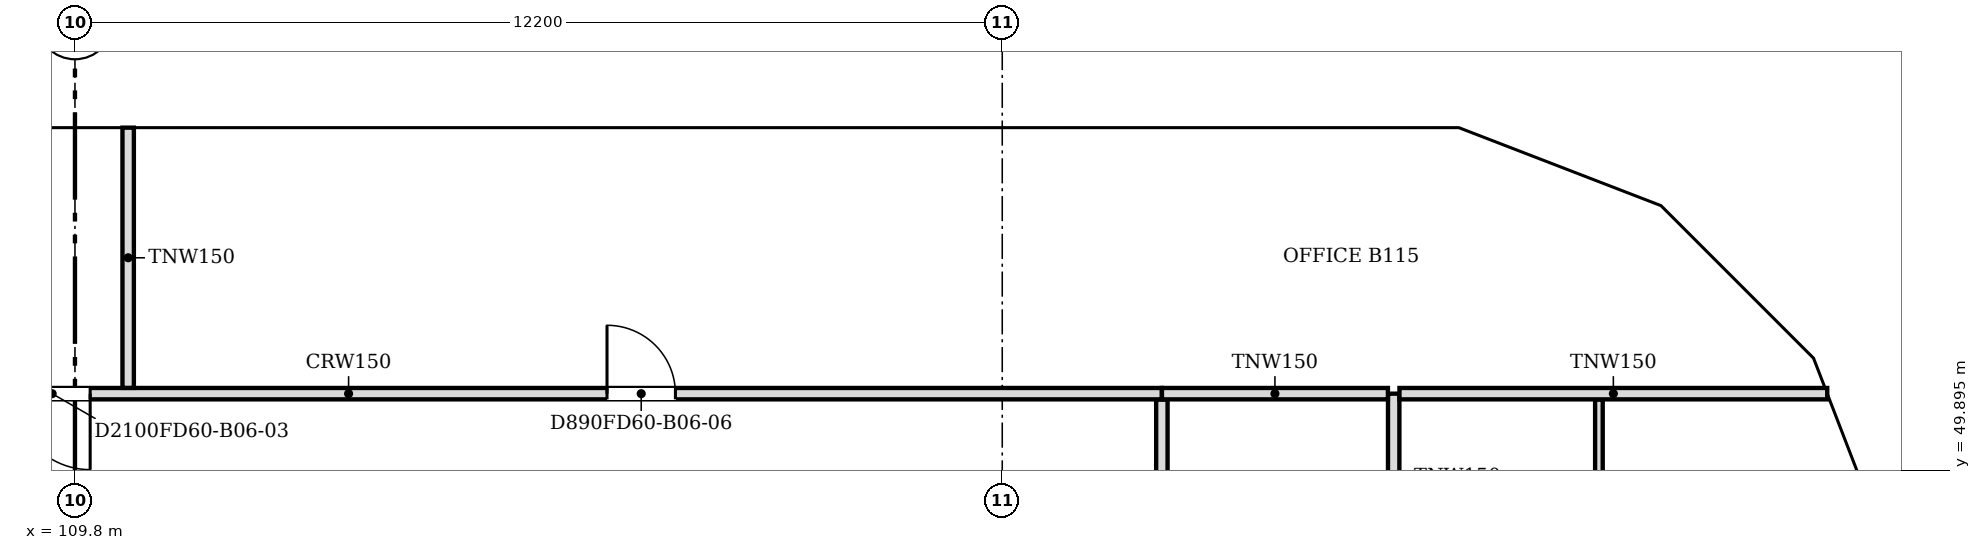
"""IFC4 building model, lengths in metres.
Left out: names, types, materials, properties, quantities, classifications, styles, units other than length and angle.
Written with IfcOpenShell. Run it as: python <this file> out.ifc"""

import sys

from ifc_helpers import new_model, si_unit, direction, frame, frame_2d, origin, place, context, subcontext, project, spatial, polyline, rectangle, outline, extrude, faceted_brep, source, transform, mapped, element, fill, save


model = new_model("IFC4")
c1 = context("Model", 3, precision=1e-05, world=origin(), true_north=direction((0.0, 1.0)))
c2 = subcontext(c1, "Body", "Model", "MODEL_VIEW")
j1 = project(units=[si_unit("LENGTHUNIT", "METRE"), si_unit("PLANEANGLEUNIT", "RADIAN")], contexts=[c1])
p1 = place(None, origin())
s1 = spatial("IfcSite", under=j1, at=p1, CompositionType="ELEMENT")
p2 = place(p1, origin())
s2 = spatial("IfcBuilding", under=s1, at=p2, CompositionType="ELEMENT")
p3 = place(p2, frame((0.0, 0.0, 56.2)))
s3 = spatial("IfcBuildingStorey", under=s2, at=p3, CompositionType="ELEMENT", Elevation=56.2)
m1 = source(origin(), c2, "Body", "Brep", [
    faceted_brep([(2.95, -0.25, 0.0), (3.003, -0.25, 0.068), (3.003, -0.25, 7.532), (2.95, -0.25, 7.6), (0.0, -0.25, 3.8), (0.047, 0.25, 3.86), (2.898, 0.25, 7.532), (2.898, 0.25, 0.068), (0.047, 0.25, 3.74), (2.95, 0.0, 0.0), (2.95, 0.0, 7.6), (0.0, 0.0, 3.8)], [[[0, 1, 2, 3, 4]], [[5, 6, 7, 8]], [[1, 0, 9]], [[10, 3, 2]], [[6, 5, 11, 4, 3, 10]], [[8, 7, 9, 0, 4, 11]], [[8, 11, 5]], [[1, 9, 7, 6, 10, 2]]]),
])
p4 = place(p3, frame((133.95, 48.753, -3.8), z_axis=(0.0, 0.0, 1.0), x_axis=(-0.359855894603, 0.933007896601, 0.0)))
e1 = element("IfcWall", 1, at=p4, inside=s3, PredefinedType="SOLIDWALL", context=c2, shape_type="MappedRepresentation", body=[
    mapped(m1, transform((0.0, 0.0, 0.0), scale=1.0)),
])
m2 = source(origin(), c2, "Body", "SweptSolid", [
    extrude(outline(polyline([(2.75, 6.935), (0.316, 3.8), (2.75, 0.665), (2.75, 6.935)])), frame((0.0, 0.26, 0.0), z_axis=(0.0, -1.0, 0.0), x_axis=(1.0, 0.0, 0.0)), (0.0, 0.0, 1.0), 0.52),
])
p5 = place(p4, origin())
e2 = element("IfcOpeningElement", 2, at=p5, cuts=e1, PredefinedType="OPENING", context=c2, shape_type="MappedRepresentation", body=[
    mapped(m2, transform((0.0, 0.0, 0.0), scale=1.0)),
])
m3 = source(origin(), c2, "Body", "Brep", [
    faceted_brep([(0.053, -0.25, 0.0), (2.997, -0.25, 3.8), (0.053, -0.25, 7.6), (0.0, -0.25, 7.532), (0.0, -0.25, 0.068), (0.106, 0.25, 7.532), (2.944, 0.25, 3.868), (2.944, 0.25, 3.732), (0.106, 0.25, 0.068), (2.997, 0.0, 3.8), (0.053, 0.0, 0.0), (0.053, 0.0, 7.6)], [[[0, 1, 2, 3, 4]], [[5, 6, 7, 8]], [[8, 7, 9, 1, 0, 10]], [[6, 5, 11, 2, 1, 9]], [[3, 2, 11]], [[10, 0, 4]], [[8, 10, 4, 3, 11, 5]], [[9, 7, 6]]]),
])
p6 = place(p3, frame((132.926, 51.469, -3.8), z_axis=(0.0, 0.0, 1.0), x_axis=(-0.707066050402, 0.707147509625, 0.0)))
e3 = element("IfcWall", 3, at=p6, inside=s3, PredefinedType="SOLIDWALL", context=c2, shape_type="MappedRepresentation", body=[
    mapped(m3, transform((0.0, 0.0, 0.0), scale=1.0)),
])
m4 = source(origin(), c2, "Body", "SweptSolid", [
    extrude(outline(polyline([(0.253, 0.667), (2.681, 3.8), (0.253, 6.934), (0.253, 0.667)])), frame((0.0, 0.26, 0.0), z_axis=(0.0, -1.0, 0.0), x_axis=(1.0, 0.0, 0.0)), (0.0, 0.0, 1.0), 0.52),
])
p7 = place(p6, origin())
e4 = element("IfcOpeningElement", 4, at=p7, cuts=e3, PredefinedType="OPENING", context=c2, shape_type="MappedRepresentation", body=[
    mapped(m4, transform((0.0, 0.0, 0.0), scale=1.0)),
])
m5 = source(origin(), c2, "Body", "Brep", [
    faceted_brep([(2.95, -0.25, 0.0), (2.997, -0.25, 0.059), (2.997, -0.25, 7.541), (2.95, -0.25, 7.6), (0.0, -0.25, 3.8), (0.053, 0.25, 3.868), (2.904, 0.25, 7.54), (2.904, 0.25, 0.06), (0.053, 0.25, 3.732), (2.95, 0.0, 0.0), (2.95, 0.0, 7.6), (0.0, 0.0, 3.8)], [[[0, 1, 2, 3, 4]], [[5, 6, 7, 8]], [[1, 0, 9]], [[10, 3, 2]], [[6, 5, 11, 4, 3, 10]], [[8, 7, 9, 0, 4, 11]], [[8, 11, 5]], [[1, 9, 7, 6, 10, 2]]]),
])
p8 = place(p3, frame((130.806, 53.588, -3.8), z_axis=(0.0, 0.0, 1.0), x_axis=(-0.932990326376, 0.359901446078, 0.0)))
e5 = element("IfcWall", 5, at=p8, inside=s3, PredefinedType="SOLIDWALL", context=c2, shape_type="MappedRepresentation", body=[
    mapped(m5, transform((0.0, 0.0, 0.0), scale=1.0)),
])
p9 = place(p8, origin())
e6 = element("IfcOpeningElement", 6, at=p9, cuts=e5, PredefinedType="OPENING", context=c2, shape_type="MappedRepresentation", body=[
    mapped(m2, transform((0.0, 0.0, 0.0), scale=1.0)),
])
m6 = source(origin(), c2, "Body", "Brep", [
    faceted_brep([(0.047, -0.25, 0.0), (3.05, -0.25, 3.8), (0.047, -0.25, 7.6), (0.0, -0.25, 7.54), (0.0, -0.25, 0.06), (0.093, 0.25, 7.541), (3.05, 0.25, 3.8), (0.093, 0.25, 0.059), (0.047, 0.0, 0.0), (0.047, 0.0, 7.6)], [[[0, 1, 2, 3, 4]], [[5, 6, 7]], [[7, 6, 1, 0, 8]], [[6, 5, 9, 2, 1]], [[3, 2, 9]], [[8, 0, 4]], [[7, 8, 4, 3, 9, 5]]]),
])
p10 = place(p3, frame((128.1, 54.65, -3.8), z_axis=(0.0, 0.0, 1.0), x_axis=(-1.0, 0.0, 0.0)))
e7 = element("IfcWall", 7, at=p10, inside=s3, PredefinedType="SOLIDWALL", context=c2, shape_type="MappedRepresentation", body=[
    mapped(m6, transform((0.0, 0.0, 0.0), scale=1.0)),
])
m7 = source(origin(), c2, "Body", "SweptSolid", [
    extrude(outline(polyline([(0.247, 0.656), (2.731, 3.8), (0.247, 6.944), (0.247, 0.656)])), frame((0.0, 0.26, 0.0), z_axis=(0.0, -1.0, 0.0), x_axis=(1.0, 0.0, 0.0)), (0.0, 0.0, 1.0), 0.52),
])
p11 = place(p10, origin())
e8 = element("IfcOpeningElement", 8, at=p11, cuts=e7, PredefinedType="OPENING", context=c2, shape_type="MappedRepresentation", body=[
    mapped(m7, transform((0.0, 0.0, 0.0), scale=1.0)),
])
m8 = source(origin(), c2, "Body", "SweptSolid", [
    extrude(outline(polyline([(3.05, 0.0), (6.1, 3.8), (3.05, 7.6), (0.0, 3.8), (3.05, 0.0)])), frame((0.0, 0.25, 0.0), z_axis=(0.0, -1.0, 0.0), x_axis=(1.0, 0.0, 0.0)), (0.0, 0.0, 1.0), 0.5),
])
p12 = place(p3, frame((125.05, 54.65, -3.8), z_axis=(0.0, 0.0, 1.0), x_axis=(-1.0, 0.0, 0.0)))
e9 = element("IfcWall", 9, at=p12, inside=s3, PredefinedType="SOLIDWALL", context=c2, shape_type="MappedRepresentation", body=[
    mapped(m8, transform((0.0, 0.0, 0.0), scale=1.0)),
])
m9 = source(origin(), c2, "Body", "SweptSolid", [
    extrude(outline(polyline([(3.05, 0.399), (5.78, 3.8), (3.05, 7.201), (0.321, 3.8), (3.05, 0.399)])), frame((0.0, 0.26, 0.0), z_axis=(0.0, -1.0, 0.0), x_axis=(1.0, 0.0, 0.0)), (0.0, 0.0, 1.0), 0.52),
])
p13 = place(p12, origin())
e10 = element("IfcOpeningElement", 10, at=p13, cuts=e9, PredefinedType="OPENING", context=c2, shape_type="MappedRepresentation", body=[
    mapped(m9, transform((0.0, 0.0, 0.0), scale=1.0)),
])
m10 = source(origin(), c2, "Body", "Brep", [
    faceted_brep([(3.05, -0.25, 0.0), (6.1, -0.25, 3.8), (6.1, -0.25, 3.8), (3.05, -0.25, 7.6), (0.0, -0.25, 3.8), (0.0, 0.25, 3.8), (3.05, 0.25, 7.6), (6.1, 0.25, 3.8), (6.1, 0.25, 3.8), (3.05, 0.25, 0.0)], [[[0, 1, 2, 3, 4]], [[5, 6, 7, 8, 9]], [[9, 8, 1, 0]], [[7, 6, 3, 2]], [[6, 5, 4, 3]], [[5, 9, 0, 4]], [[1, 8, 7, 2]]]),
])
p14 = place(p3, frame((118.95, 54.65, -3.8), z_axis=(0.0, 0.0, 1.0), x_axis=(-1.0, 0.0, 0.0)))
e11 = element("IfcWall", 11, at=p14, inside=s3, PredefinedType="SOLIDWALL", context=c2, shape_type="MappedRepresentation", body=[
    mapped(m10, transform((0.0, 0.0, 0.0), scale=1.0)),
])
p15 = place(p14, origin())
e12 = element("IfcOpeningElement", 12, at=p15, cuts=e11, PredefinedType="OPENING", context=c2, shape_type="MappedRepresentation", body=[
    mapped(m9, transform((0.0, 0.0, 0.0), scale=1.0)),
])
p16 = place(p3, frame((112.85, 54.65, -3.8), z_axis=(0.0, 0.0, 1.0), x_axis=(-1.0, 0.0, 0.0)))
e13 = element("IfcWall", 13, at=p16, inside=s3, PredefinedType="SOLIDWALL", context=c2, shape_type="MappedRepresentation", body=[
    mapped(m8, transform((0.0, 0.0, 0.0), scale=1.0)),
])
p17 = place(p16, origin())
e14 = element("IfcOpeningElement", 14, at=p17, cuts=e13, PredefinedType="OPENING", context=c2, shape_type="MappedRepresentation", body=[
    mapped(m9, transform((0.0, 0.0, 0.0), scale=1.0)),
])
p18 = place(p2, frame((0.0, 0.0, 60.0)))
s4 = spatial("IfcBuildingStorey", under=s2, at=p18, CompositionType="ELEMENT", Elevation=60.0)
m11 = source(origin(), c2, "Body", "Brep", [
    faceted_brep([(0.047, -0.25, 0.0), (2.997, -0.25, 3.8), (0.047, -0.25, 7.6), (0.0, -0.25, 7.541), (0.0, -0.25, 0.059), (0.093, 0.25, 7.54), (2.944, 0.25, 3.868), (2.944, 0.25, 3.732), (0.093, 0.25, 0.06), (2.997, 0.0, 3.8), (0.047, 0.0, 0.0), (0.047, 0.0, 7.6)], [[[0, 1, 2, 3, 4]], [[5, 6, 7, 8]], [[8, 7, 9, 1, 0, 10]], [[6, 5, 11, 2, 1, 9]], [[3, 2, 11]], [[10, 0, 4]], [[8, 10, 4, 3, 11, 5]], [[9, 7, 6]]]),
])
p19 = place(p18, frame((133.967, 48.71, -3.8), z_axis=(0.0, 0.0, 1.0), x_axis=(-0.359901446078, 0.932990326376, 0.0)))
e15 = element("IfcWall", 15, at=p19, inside=s4, PredefinedType="SOLIDWALL", context=c2, shape_type="MappedRepresentation", body=[
    mapped(m11, transform((0.0, 0.0, 0.0), scale=1.0)),
])
m12 = source(origin(), c2, "Body", "SweptSolid", [
    extrude(outline(polyline([(0.247, 0.665), (2.681, 3.8), (0.247, 6.935), (0.247, 0.665)])), frame((0.0, 0.26, 0.0), z_axis=(0.0, -1.0, 0.0), x_axis=(1.0, 0.0, 0.0)), (0.0, 0.0, 1.0), 0.52),
])
p20 = place(p19, origin())
e16 = element("IfcOpeningElement", 16, at=p20, cuts=e15, PredefinedType="OPENING", context=c2, shape_type="MappedRepresentation", body=[
    mapped(m12, transform((0.0, 0.0, 0.0), scale=1.0)),
])
m13 = source(origin(), c2, "Body", "Brep", [
    faceted_brep([(2.944, -0.25, 0.0), (2.997, -0.25, 0.068), (2.997, -0.25, 7.532), (2.944, -0.25, 7.6), (0.0, -0.25, 3.8), (0.053, 0.25, 3.868), (2.891, 0.25, 7.532), (2.891, 0.25, 0.068), (0.053, 0.25, 3.732), (2.944, 0.0, 0.0), (2.944, 0.0, 7.6), (0.0, 0.0, 3.8)], [[[0, 1, 2, 3, 4]], [[5, 6, 7, 8]], [[1, 0, 9]], [[10, 3, 2]], [[6, 5, 11, 4, 3, 10]], [[8, 7, 9, 0, 4, 11]], [[8, 11, 5]], [[1, 9, 7, 6, 10, 2]]]),
])
p21 = place(p18, frame((132.888, 51.506, -3.8), z_axis=(0.0, 0.0, 1.0), x_axis=(-0.707147509625, 0.707066050402, 0.0)))
e17 = element("IfcWall", 17, at=p21, inside=s4, PredefinedType="SOLIDWALL", context=c2, shape_type="MappedRepresentation", body=[
    mapped(m13, transform((0.0, 0.0, 0.0), scale=1.0)),
])
m14 = source(origin(), c2, "Body", "SweptSolid", [
    extrude(outline(polyline([(2.744, 6.934), (0.316, 3.8), (2.744, 0.666), (2.744, 6.934)])), frame((0.0, 0.26, 0.0), z_axis=(0.0, -1.0, 0.0), x_axis=(1.0, 0.0, 0.0)), (0.0, 0.0, 1.0), 0.52),
])
p22 = place(p21, origin())
e18 = element("IfcOpeningElement", 18, at=p22, cuts=e17, PredefinedType="OPENING", context=c2, shape_type="MappedRepresentation", body=[
    mapped(m14, transform((0.0, 0.0, 0.0), scale=1.0)),
])
m15 = source(origin(), c2, "Body", "Brep", [
    faceted_brep([(0.053, -0.25, 0.0), (3.003, -0.25, 3.8), (0.053, -0.25, 7.6), (0.0, -0.25, 7.532), (0.0, -0.25, 0.068), (0.106, 0.25, 7.532), (2.957, 0.25, 3.86), (2.957, 0.25, 3.74), (0.106, 0.25, 0.068), (3.003, 0.0, 3.8), (0.053, 0.0, 0.0), (0.053, 0.0, 7.6)], [[[0, 1, 2, 3, 4]], [[5, 6, 7, 8]], [[8, 7, 9, 1, 0, 10]], [[6, 5, 11, 2, 1, 9]], [[3, 2, 11]], [[10, 0, 4]], [[8, 10, 4, 3, 11, 5]], [[9, 7, 6]]]),
])
p23 = place(p18, frame((130.856, 53.569, -3.8), z_axis=(0.0, 0.0, 1.0), x_axis=(-0.933007896601, 0.359855894603, 0.0)))
e19 = element("IfcWall", 19, at=p23, inside=s4, PredefinedType="SOLIDWALL", context=c2, shape_type="MappedRepresentation", body=[
    mapped(m15, transform((0.0, 0.0, 0.0), scale=1.0)),
])
m16 = source(origin(), c2, "Body", "SweptSolid", [
    extrude(outline(polyline([(0.253, 0.665), (2.687, 3.8), (0.253, 6.935), (0.253, 0.665)])), frame((0.0, 0.26, 0.0), z_axis=(0.0, -1.0, 0.0), x_axis=(1.0, 0.0, 0.0)), (0.0, 0.0, 1.0), 0.52),
])
p24 = place(p23, origin())
e20 = element("IfcOpeningElement", 20, at=p24, cuts=e19, PredefinedType="OPENING", context=c2, shape_type="MappedRepresentation", body=[
    mapped(m16, transform((0.0, 0.0, 0.0), scale=1.0)),
])
m17 = source(origin(), c2, "Body", "Brep", [
    faceted_brep([(3.003, -0.25, 0.0), (6.053, -0.25, 3.8), (3.003, -0.25, 7.6), (0.0, -0.25, 3.8), (0.047, 0.25, 3.859), (3.003, 0.25, 7.6), (6.053, 0.25, 3.8), (3.003, 0.25, 0.0), (0.047, 0.25, 3.741), (0.0, 0.0, 3.8)], [[[0, 1, 2, 3]], [[4, 5, 6, 7, 8]], [[7, 6, 1, 0]], [[6, 5, 2, 1]], [[5, 4, 9, 3, 2]], [[8, 7, 0, 3, 9]], [[8, 9, 4]]]),
])
p25 = place(p18, frame((128.053, 54.65, -3.8), z_axis=(0.0, 0.0, 1.0), x_axis=(-1.0, 0.0, 0.0)))
e21 = element("IfcWall", 21, at=p25, inside=s4, PredefinedType="SOLIDWALL", context=c2, shape_type="MappedRepresentation", body=[
    mapped(m17, transform((0.0, 0.0, 0.0), scale=1.0)),
])
m18 = source(origin(), c2, "Body", "SweptSolid", [
    extrude(outline(polyline([(3.005, 0.401), (5.733, 3.8), (3.005, 7.199), (0.319, 3.8), (3.005, 0.401)])), frame((0.0, 0.26, 0.0), z_axis=(0.0, -1.0, 0.0), x_axis=(1.0, 0.0, 0.0)), (0.0, 0.0, 1.0), 0.52),
])
p26 = place(p25, origin())
e22 = element("IfcOpeningElement", 22, at=p26, cuts=e21, PredefinedType="OPENING", context=c2, shape_type="MappedRepresentation", body=[
    mapped(m18, transform((0.0, 0.0, 0.0), scale=1.0)),
])
p27 = place(p18, frame((122.0, 54.65, -3.8), z_axis=(0.0, 0.0, 1.0), x_axis=(-1.0, 0.0, 0.0)))
e23 = element("IfcWall", 23, at=p27, inside=s4, PredefinedType="SOLIDWALL", context=c2, shape_type="MappedRepresentation", body=[
    mapped(m8, transform((0.0, 0.0, 0.0), scale=1.0)),
])
p28 = place(p27, origin())
e24 = element("IfcOpeningElement", 24, at=p28, cuts=e23, PredefinedType="OPENING", context=c2, shape_type="MappedRepresentation", body=[
    mapped(m9, transform((0.0, 0.0, 0.0), scale=1.0)),
])
p29 = place(p18, frame((115.9, 54.65, -3.8), z_axis=(0.0, 0.0, 1.0), x_axis=(-1.0, 0.0, 0.0)))
e25 = element("IfcWall", 25, at=p29, inside=s4, PredefinedType="SOLIDWALL", context=c2, shape_type="MappedRepresentation", body=[
    mapped(m10, transform((0.0, 0.0, 0.0), scale=1.0)),
])
p30 = place(p29, origin())
e26 = element("IfcOpeningElement", 26, at=p30, cuts=e25, PredefinedType="OPENING", context=c2, shape_type="MappedRepresentation", body=[
    mapped(m9, transform((0.0, 0.0, 0.0), scale=1.0)),
])
p31 = place(p18, frame((109.8, 54.65, -3.8), z_axis=(0.0, 0.0, 1.0), x_axis=(-1.0, 0.0, 0.0)))
e27 = element("IfcWall", 27, at=p31, inside=s4, PredefinedType="SOLIDWALL", context=c2, shape_type="MappedRepresentation", body=[
    mapped(m8, transform((0.0, 0.0, 0.0), scale=1.0)),
])
p32 = place(p31, origin())
e28 = element("IfcOpeningElement", 28, at=p32, cuts=e27, PredefinedType="OPENING", context=c2, shape_type="MappedRepresentation", body=[
    mapped(m9, transform((0.0, 0.0, 0.0), scale=1.0)),
])
p33 = place(p3, frame((124.1, 50.824, 0.0), z_axis=(0.0, 0.0, 1.0), x_axis=(0.0, -1.0, 0.0)))
e29 = element("IfcWall", 29, at=p33, inside=s3, PredefinedType="PARTITIONING", context=c2, shape_type="SweptSolid", body=[
    extrude(rectangle(XDim=14.224, YDim=0.15, at=frame_2d((7.112, 0.0))), origin(), (0.0, 0.0, 1.0), 3.067),
])
m19 = source(origin(), c2, "Body", "SweptSolid", [
    extrude(rectangle(XDim=1.0, YDim=2.1, at=frame_2d((0.5, 1.05))), frame((0.0, 0.085, 0.0), z_axis=(0.0, -1.0, 0.0), x_axis=(1.0, 0.0, 0.0)), (0.0, 0.0, 1.0), 0.17),
])
p34 = place(p33, frame((2.123, 0.0, 0.0)))
e30 = element("IfcOpeningElement", 30, at=p34, cuts=e29, PredefinedType="OPENING", context=c2, shape_type="MappedRepresentation", body=[
    mapped(m19, transform((0.0, 0.0, 0.0), scale=1.0)),
])
p35 = place(p33, frame((9.224, 0.0, 0.0)))
e31 = element("IfcOpeningElement", 31, at=p35, cuts=e29, PredefinedType="OPENING", context=c2, shape_type="MappedRepresentation", body=[
    mapped(m19, transform((0.0, 0.0, 0.0), scale=1.0)),
])
p36 = place(p3, frame((127.15, 50.9, 0.0), z_axis=(0.0, 0.0, 1.0), x_axis=(0.0, -1.0, 0.0)))
e32 = element("IfcWall", 32, at=p36, inside=s3, PredefinedType="PARTITIONING", context=c2, shape_type="SweptSolid", body=[
    extrude(rectangle(XDim=5.3, YDim=0.15, at=frame_2d((2.65, 0.0))), origin(), (0.0, 0.0, 1.0), 3.067),
])
m20 = source(origin(), c2, "Body", "SweptSolid", [
    extrude(rectangle(XDim=0.9, YDim=2.1, at=frame_2d((0.45, 1.05))), frame((0.0, 0.085, 0.0), z_axis=(0.0, -1.0, 0.0), x_axis=(1.0, 0.0, 0.0)), (0.0, 0.0, 1.0), 0.17),
])
p37 = place(p36, frame((2.2, 0.0, 0.0)))
e33 = element("IfcOpeningElement", 33, at=p37, cuts=e32, PredefinedType="OPENING", context=c2, shape_type="MappedRepresentation", body=[
    mapped(m20, transform((0.0, 0.0, 0.0), scale=1.0)),
])
p38 = place(p3, frame((129.85, 50.824, 0.0), z_axis=(0.0, 0.0, 1.0), x_axis=(0.0, -1.0, 0.0)))
e34 = element("IfcWall", 34, at=p38, inside=s3, PredefinedType="PARTITIONING", context=c2, shape_type="SweptSolid", body=[
    extrude(rectangle(XDim=5.223, YDim=0.1, at=frame_2d((2.611, 0.0))), origin(), (0.0, 0.0, 1.0), 3.067),
])
m21 = source(origin(), c2, "Body", "SweptSolid", [
    extrude(rectangle(XDim=0.9, YDim=2.1, at=frame_2d((0.45, 1.05))), frame((0.0, 0.06, 0.0), z_axis=(0.0, -1.0, 0.0), x_axis=(1.0, 0.0, 0.0)), (0.0, 0.0, 1.0), 0.12),
])
p39 = place(p38, frame((2.123, 0.0, 0.0)))
e35 = element("IfcOpeningElement", 35, at=p39, cuts=e34, PredefinedType="OPENING", context=c2, shape_type="MappedRepresentation", body=[
    mapped(m21, transform((0.0, 0.0, 0.0), scale=1.0)),
])
p40 = place(p3, frame((108.5, 50.9, 0.0), z_axis=(0.0, 0.0, 1.0), x_axis=(1.0, 0.0, 0.0)))
e36 = element("IfcWall", 36, at=p40, inside=s3, PredefinedType="PARTITIONING", context=c2, shape_type="SweptSolid", body=[
    extrude(rectangle(XDim=15.6, YDim=0.15, at=frame_2d((7.8, 0.0))), origin(), (0.0, 0.0, 1.0), 3.067),
])
p41 = place(p40, frame((0.5, 0.0, 0.0)))
e37 = element("IfcOpeningElement", 37, at=p41, cuts=e36, PredefinedType="OPENING", context=c2, shape_type="MappedRepresentation", body=[
    mapped(m19, transform((0.0, 0.0, 0.0), scale=1.0)),
])
p42 = place(p40, frame((8.3, 0.0, 0.0)))
e38 = element("IfcOpeningElement", 38, at=p42, cuts=e36, PredefinedType="OPENING", context=c2, shape_type="MappedRepresentation", body=[
    mapped(m20, transform((0.0, 0.0, 0.0), scale=1.0)),
])
p43 = place(p3, frame((124.101, 50.9, 0.0), z_axis=(0.0, 0.0, 1.0), x_axis=(1.0, 0.0, 0.0)))
e39 = element("IfcWall", 39, at=p43, inside=s3, PredefinedType="PARTITIONING", context=c2, shape_type="SweptSolid", body=[
    extrude(rectangle(XDim=2.973, YDim=0.15, at=frame_2d((1.486, 0.0))), origin(), (0.0, 0.0, 1.0), 3.067),
])
p44 = place(p3, frame((127.226, 50.9, 0.0), z_axis=(0.0, 0.0, 1.0), x_axis=(1.0, 0.0, 0.0)))
e40 = element("IfcWall", 40, at=p44, inside=s3, PredefinedType="PARTITIONING", context=c2, shape_type="SweptSolid", body=[
    extrude(rectangle(XDim=5.628, YDim=0.15, at=frame_2d((2.814, 0.0))), origin(), (0.0, 0.0, 1.0), 3.067),
])
p45 = place(p3, frame((110.5, 50.976, 0.0), z_axis=(0.0, 0.0, 1.0), x_axis=(0.0, 1.0, 0.0)))
e41 = element("IfcWall", 41, at=p45, inside=s3, PredefinedType="PARTITIONING", context=c2, shape_type="SweptSolid", body=[
    extrude(rectangle(XDim=3.424, YDim=0.15, at=frame_2d((1.712, 0.0))), origin(), (0.0, 0.0, 1.0), 3.067),
])
m22 = source(origin(), c2, "Body", "SweptSolid", [
    extrude(rectangle(XDim=1.0, YDim=2.1, at=frame_2d((0.5, 1.05))), frame((0.0, 0.025, 0.0), z_axis=(0.0, -1.0, 0.0), x_axis=(1.0, 0.0, 0.0)), (0.0, 0.0, 1.0), 0.05),
])
p46 = place(p41, origin())
e42 = element("IfcDoor", 42, at=p46, inside=s3, OperationType="SINGLE_SWING_RIGHT", PredefinedType="DOOR", context=c2, shape_type="MappedRepresentation", body=[
    mapped(m22, transform((0.0, 0.0, 0.0), scale=1.0)),
])
fill(e37, e42)
m23 = source(origin(), c2, "Body", "SweptSolid", [
    extrude(rectangle(XDim=0.9, YDim=2.1, at=frame_2d((0.45, 1.05))), frame((0.0, 0.025, 0.0), z_axis=(0.0, -1.0, 0.0), x_axis=(1.0, 0.0, 0.0)), (0.0, 0.0, 1.0), 0.05),
])
p47 = place(p42, origin())
e43 = element("IfcDoor", 43, at=p47, inside=s3, OperationType="SINGLE_SWING_LEFT", PredefinedType="DOOR", context=c2, shape_type="MappedRepresentation", body=[
    mapped(m23, transform((0.0, 0.0, 0.0), scale=1.0)),
])
fill(e38, e43)
save(model, sys.argv[1])
